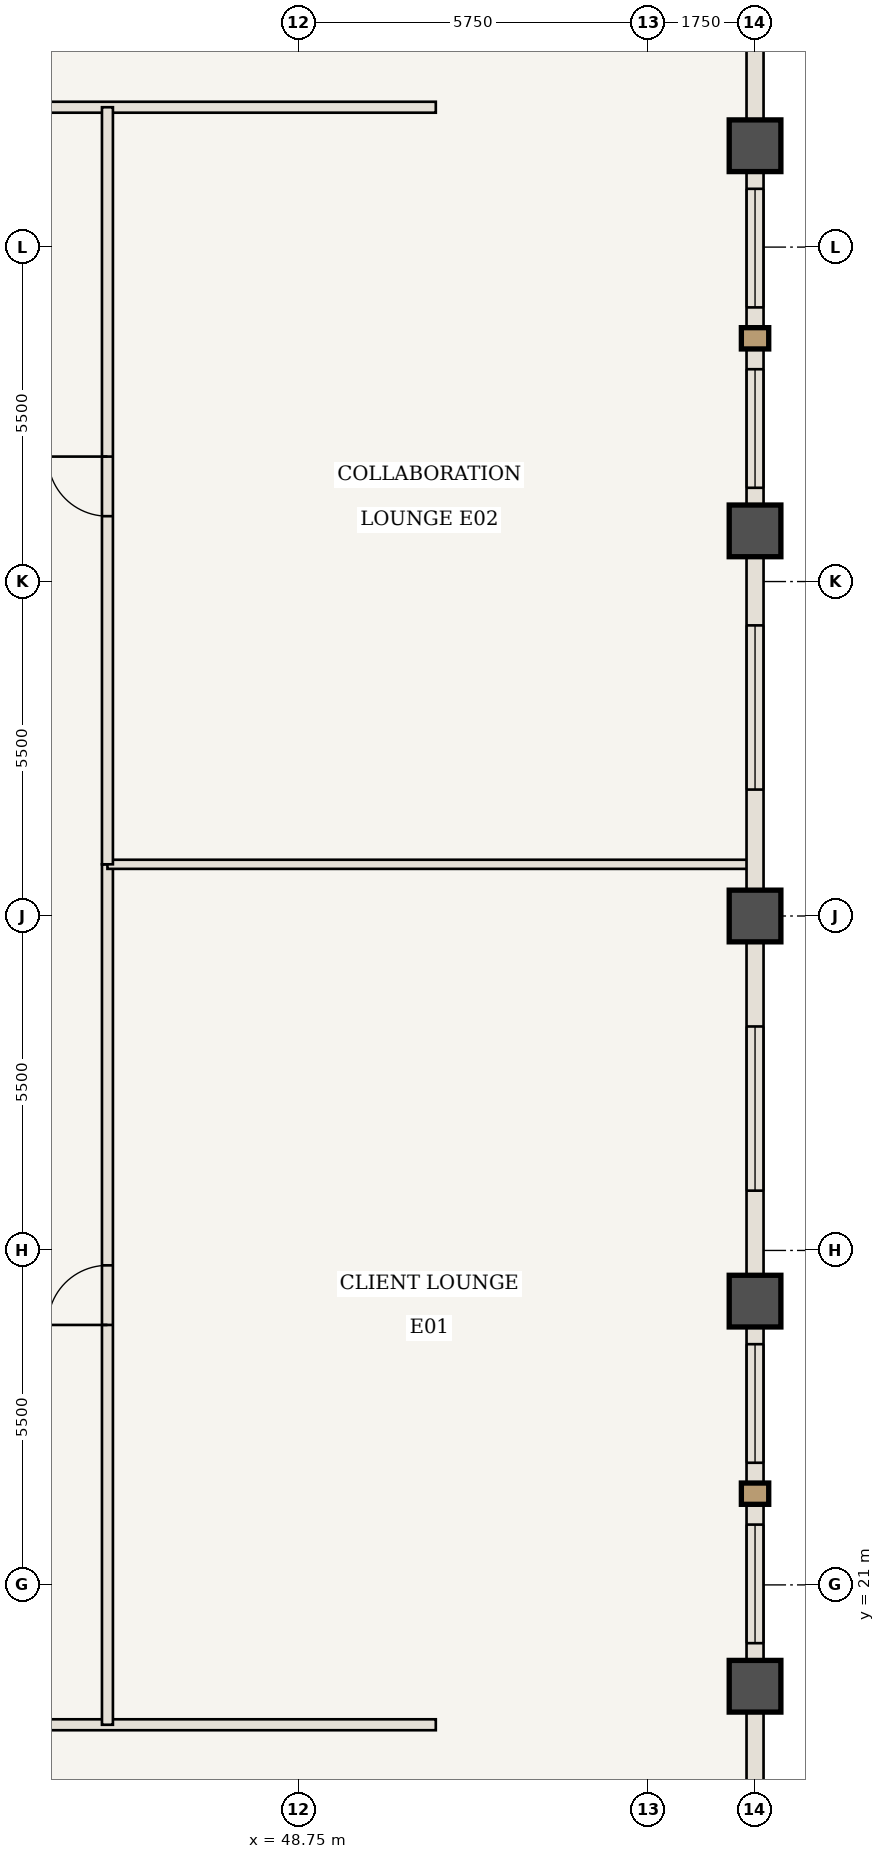
"""IFC4 building model, lengths in metres.
Left out: names, types, materials, properties, quantities, classifications, styles, units other than length and angle.
Written with IfcOpenShell. Run it as: python <this file> out.ifc"""

import sys

from ifc_helpers import new_model, si_unit, direction, frame, frame_2d, origin, origin_2d, place, context, subcontext, project, spatial, rectangle, extrude, element, fill, save


model = new_model("IFC4")
c1 = context("Model", 3, precision=1e-05, world=origin(), true_north=direction((0.0, 1.0)))
c2 = subcontext(c1, "Body", "Model", "MODEL_VIEW")
j1 = project(units=[si_unit("LENGTHUNIT", "METRE"), si_unit("PLANEANGLEUNIT", "RADIAN")], contexts=[c1])
p1 = place(None, origin())
s1 = spatial("IfcSite", under=j1, at=p1, CompositionType="ELEMENT")
p2 = place(p1, origin())
s2 = spatial("IfcBuilding", under=s1, at=p2, CompositionType="ELEMENT")
p3 = place(p2, frame((0.0, 0.0, 210.0)))
s3 = spatial("IfcBuildingStorey", under=s2, at=p3, CompositionType="ELEMENT", Elevation=210.0)
for number, where, z_axis, x_axis in (
    (1, (56.25, 19.333, 0.0), (0.0, 0.0, 1.0), (1.0, 0.0, 0.0)),
    (2, (56.25, 25.667, 0.0), (0.0, 0.0, 1.0), (1.0, 0.0, 0.0)),
    (3, (56.25, 32.0, 0.0), (0.0, 0.0, 1.0), (1.0, 0.0, 0.0)),
    (4, (56.25, 38.333, 0.0), (0.0, 0.0, 1.0), (1.0, 0.0, 0.0)),
    (5, (56.25, 44.667, 0.0), (0.0, 0.0, 1.0), (1.0, 0.0, 0.0)),
):
    element("IfcColumn", number, at=place(p3, frame(where, z_axis=z_axis, x_axis=x_axis)), inside=s3, PredefinedType="COLUMN", context=c2, shape_type="SweptSolid", body=[
        extrude(rectangle(XDim=0.85, YDim=0.85, at=origin_2d()), origin(), (0.0, 0.0, 1.0), 3.85),
    ])
p4 = place(p3, frame((32.925, 18.7, 0.0), z_axis=(0.0, 0.0, 1.0), x_axis=(1.0, 0.0, 0.0)))
e6 = element("IfcWall", 6, at=p4, inside=s3, PredefinedType="STANDARD", context=c2, shape_type="SweptSolid", body=[
    extrude(rectangle(XDim=18.075, YDim=0.18, at=frame_2d((9.038, 0.0))), origin(), (0.0, 0.0, 1.0), 3.685),
])
p5 = place(p4, frame((5.812, 0.0, 0.0)))
e7 = element("IfcOpeningElement", 7, at=p5, cuts=e6, PredefinedType="OPENING", context=c2, shape_type="SweptSolid", body=[
    extrude(rectangle(XDim=0.98, YDim=2.2, at=frame_2d((0.49, 1.1))), frame((0.0, 0.1, 0.0), z_axis=(0.0, -1.0, 0.0), x_axis=(1.0, 0.0, 0.0)), (0.0, 0.0, 1.0), 0.2),
])
p6 = place(p3, frame((24.542, 45.3, 0.0), z_axis=(0.0, 0.0, 1.0), x_axis=(1.0, 0.0, 0.0)))
e8 = element("IfcWall", 8, at=p6, inside=s3, PredefinedType="STANDARD", context=c2, shape_type="SweptSolid", body=[
    extrude(rectangle(XDim=26.458, YDim=0.18, at=frame_2d((13.229, 0.0))), origin(), (0.0, 0.0, 1.0), 3.685),
])
p7 = place(p6, frame((10.004, 0.0, 0.0)))
e9 = element("IfcOpeningElement", 9, at=p7, cuts=e8, PredefinedType="OPENING", context=c2, shape_type="SweptSolid", body=[
    extrude(rectangle(XDim=0.98, YDim=2.2, at=frame_2d((0.49, 1.1))), frame((0.0, 0.1, 0.0), z_axis=(0.0, -1.0, 0.0), x_axis=(1.0, 0.0, 0.0)), (0.0, 0.0, 1.0), 0.2),
])
p8 = place(p3, frame((45.6, 18.7, 0.0), z_axis=(0.0, 0.0, 1.0), x_axis=(0.0, 1.0, 0.0)))
e10 = element("IfcWall", 10, at=p8, inside=s3, PredefinedType="STANDARD", context=c2, shape_type="SweptSolid", body=[
    extrude(rectangle(XDim=14.15, YDim=0.18, at=frame_2d((7.075, 0.0))), origin(), (0.0, 0.0, 1.0), 3.685),
])
p9 = place(p8, frame((6.575, 0.0, 0.0)))
e11 = element("IfcOpeningElement", 11, at=p9, cuts=e10, PredefinedType="OPENING", context=c2, shape_type="SweptSolid", body=[
    extrude(rectangle(XDim=0.98, YDim=2.2, at=frame_2d((0.49, 1.1))), frame((0.0, 0.1, 0.0), z_axis=(0.0, -1.0, 0.0), x_axis=(1.0, 0.0, 0.0)), (0.0, 0.0, 1.0), 0.2),
])
p10 = place(p3, frame((45.6, 32.85, 0.0), z_axis=(0.0, 0.0, 1.0), x_axis=(1.0, 0.0, 0.0)))
e12 = element("IfcWall", 12, at=p10, inside=s3, PredefinedType="STANDARD", context=c2, shape_type="SweptSolid", body=[
    extrude(rectangle(XDim=10.59, YDim=0.15, at=frame_2d((5.295, 0.0))), origin(), (0.0, 0.0, 1.0), 3.685),
])
p11 = place(p3, frame((45.6, 32.85, 0.0), z_axis=(0.0, 0.0, 1.0), x_axis=(0.0, 1.0, 0.0)))
e13 = element("IfcWall", 13, at=p11, inside=s3, PredefinedType="STANDARD", context=c2, shape_type="SweptSolid", body=[
    extrude(rectangle(XDim=12.45, YDim=0.18, at=frame_2d((6.225, 0.0))), origin(), (0.0, 0.0, 1.0), 3.685),
])
p12 = place(p11, frame((5.725, 0.0, 0.0)))
e14 = element("IfcOpeningElement", 14, at=p12, cuts=e13, PredefinedType="OPENING", context=c2, shape_type="SweptSolid", body=[
    extrude(rectangle(XDim=0.98, YDim=2.2, at=frame_2d((0.49, 1.1))), frame((0.0, 0.1, 0.0), z_axis=(0.0, -1.0, 0.0), x_axis=(1.0, 0.0, 0.0)), (0.0, 0.0, 1.0), 0.2),
])
p13 = place(p3, frame((56.25, 19.333, 0.0), z_axis=(0.0, 0.0, 1.0), x_axis=(0.0, -1.0, 0.0)))
e15 = element("IfcWall", 15, at=p13, inside=s3, PredefinedType="USERDEFINED", context=c2, shape_type="SweptSolid", body=[
    extrude(rectangle(XDim=6.333, YDim=0.28, at=frame_2d((3.167, 0.0))), origin(), (0.0, 0.0, 1.0), 2.985),
])
p14 = place(p3, frame((56.25, 25.667, 0.0), z_axis=(0.0, 0.0, 1.0), x_axis=(0.0, -1.0, 0.0)))
e16 = element("IfcWall", 16, at=p14, inside=s3, PredefinedType="USERDEFINED", context=c2, shape_type="SweptSolid", body=[
    extrude(rectangle(XDim=6.333, YDim=0.28, at=frame_2d((3.167, 0.0))), origin(), (0.0, 0.0, 1.0), 2.985),
])
p15 = place(p14, frame((0.708, 0.0, 0.85)))
e17 = element("IfcOpeningElement", 17, at=p15, cuts=e16, PredefinedType="OPENING", context=c2, shape_type="SweptSolid", body=[
    extrude(rectangle(XDim=1.95, YDim=1.935, at=frame_2d((0.975, 0.968))), frame((0.0, 0.15, 0.0), z_axis=(0.0, -1.0, 0.0), x_axis=(1.0, 0.0, 0.0)), (0.0, 0.0, 1.0), 0.3),
])
p16 = place(p14, frame((3.675, 0.0, 0.85)))
e18 = element("IfcOpeningElement", 18, at=p16, cuts=e16, PredefinedType="OPENING", context=c2, shape_type="SweptSolid", body=[
    extrude(rectangle(XDim=1.95, YDim=1.935, at=frame_2d((0.975, 0.968))), frame((0.0, 0.15, 0.0), z_axis=(0.0, -1.0, 0.0), x_axis=(1.0, 0.0, 0.0)), (0.0, 0.0, 1.0), 0.3),
])
p17 = place(p3, frame((56.25, 32.0, 0.0), z_axis=(0.0, 0.0, 1.0), x_axis=(0.0, -1.0, 0.0)))
e19 = element("IfcWall", 19, at=p17, inside=s3, PredefinedType="USERDEFINED", context=c2, shape_type="SweptSolid", body=[
    extrude(rectangle(XDim=6.333, YDim=0.28, at=frame_2d((3.167, 0.0))), origin(), (0.0, 0.0, 1.0), 2.985),
])
p18 = place(p17, frame((1.817, 0.0, 0.85)))
e20 = element("IfcOpeningElement", 20, at=p18, cuts=e19, PredefinedType="OPENING", context=c2, shape_type="SweptSolid", body=[
    extrude(rectangle(XDim=2.7, YDim=1.935, at=frame_2d((1.35, 0.968))), frame((0.0, 0.15, 0.0), z_axis=(0.0, -1.0, 0.0), x_axis=(1.0, 0.0, 0.0)), (0.0, 0.0, 1.0), 0.3),
])
p19 = place(p3, frame((56.25, 38.333, 0.0), z_axis=(0.0, 0.0, 1.0), x_axis=(0.0, -1.0, 0.0)))
e21 = element("IfcWall", 21, at=p19, inside=s3, PredefinedType="USERDEFINED", context=c2, shape_type="SweptSolid", body=[
    extrude(rectangle(XDim=6.333, YDim=0.28, at=frame_2d((3.167, 0.0))), origin(), (0.0, 0.0, 1.0), 2.985),
])
p20 = place(p19, frame((1.554, 0.0, 0.85)))
e22 = element("IfcOpeningElement", 22, at=p20, cuts=e21, PredefinedType="OPENING", context=c2, shape_type="SweptSolid", body=[
    extrude(rectangle(XDim=2.7, YDim=1.935, at=frame_2d((1.35, 0.968))), frame((0.0, 0.15, 0.0), z_axis=(0.0, -1.0, 0.0), x_axis=(1.0, 0.0, 0.0)), (0.0, 0.0, 1.0), 0.3),
])
p21 = place(p3, frame((56.25, 44.667, 0.0), z_axis=(0.0, 0.0, 1.0), x_axis=(0.0, -1.0, 0.0)))
e23 = element("IfcWall", 23, at=p21, inside=s3, PredefinedType="USERDEFINED", context=c2, shape_type="SweptSolid", body=[
    extrude(rectangle(XDim=6.333, YDim=0.28, at=frame_2d((3.167, 0.0))), origin(), (0.0, 0.0, 1.0), 2.985),
])
p22 = place(p21, frame((0.708, 0.0, 0.85)))
e24 = element("IfcOpeningElement", 24, at=p22, cuts=e23, PredefinedType="OPENING", context=c2, shape_type="SweptSolid", body=[
    extrude(rectangle(XDim=1.95, YDim=1.935, at=frame_2d((0.975, 0.968))), frame((0.0, 0.15, 0.0), z_axis=(0.0, -1.0, 0.0), x_axis=(1.0, 0.0, 0.0)), (0.0, 0.0, 1.0), 0.3),
])
p23 = place(p21, frame((3.675, 0.0, 0.85)))
e25 = element("IfcOpeningElement", 25, at=p23, cuts=e23, PredefinedType="OPENING", context=c2, shape_type="SweptSolid", body=[
    extrude(rectangle(XDim=1.95, YDim=1.935, at=frame_2d((0.975, 0.968))), frame((0.0, 0.15, 0.0), z_axis=(0.0, -1.0, 0.0), x_axis=(1.0, 0.0, 0.0)), (0.0, 0.0, 1.0), 0.3),
])
p24 = place(p3, frame((56.25, 51.0, 0.0), z_axis=(0.0, 0.0, 1.0), x_axis=(0.0, -1.0, 0.0)))
e26 = element("IfcWall", 26, at=p24, inside=s3, PredefinedType="USERDEFINED", context=c2, shape_type="SweptSolid", body=[
    extrude(rectangle(XDim=6.333, YDim=0.28, at=frame_2d((3.167, 0.0))), origin(), (0.0, 0.0, 1.0), 2.985),
])
p25 = place(p9, origin())
e27 = element("IfcDoor", 27, at=p25, inside=s3, OperationType="SINGLE_SWING_LEFT", PredefinedType="DOOR", context=c2, shape_type="SweptSolid", body=[
    extrude(rectangle(XDim=0.98, YDim=2.2, at=frame_2d((0.49, 1.1))), frame((0.0, 0.025, 0.0), z_axis=(0.0, -1.0, 0.0), x_axis=(1.0, 0.0, 0.0)), (0.0, 0.0, 1.0), 0.05),
])
fill(e11, e27)
p26 = place(p12, origin())
e28 = element("IfcDoor", 28, at=p26, inside=s3, OperationType="SINGLE_SWING_RIGHT", PredefinedType="DOOR", context=c2, shape_type="SweptSolid", body=[
    extrude(rectangle(XDim=0.98, YDim=2.2, at=frame_2d((0.49, 1.1))), frame((0.0, 0.025, 0.0), z_axis=(0.0, -1.0, 0.0), x_axis=(1.0, 0.0, 0.0)), (0.0, 0.0, 1.0), 0.05),
])
fill(e14, e28)
p27 = place(p15, origin())
e29 = element("IfcWindow", 29, at=p27, inside=s3, PartitioningType="SINGLE_PANEL", PredefinedType="WINDOW", context=c2, shape_type="SweptSolid", body=[
    extrude(rectangle(XDim=1.95, YDim=1.935, at=frame_2d((0.975, 0.968))), frame((0.0, 0.03, 0.0), z_axis=(0.0, -1.0, 0.0), x_axis=(1.0, 0.0, 0.0)), (0.0, 0.0, 1.0), 0.06),
])
fill(e17, e29)
p28 = place(p16, origin())
e30 = element("IfcWindow", 30, at=p28, inside=s3, PartitioningType="SINGLE_PANEL", PredefinedType="WINDOW", context=c2, shape_type="SweptSolid", body=[
    extrude(rectangle(XDim=1.95, YDim=1.935, at=frame_2d((0.975, 0.968))), frame((0.0, 0.03, 0.0), z_axis=(0.0, -1.0, 0.0), x_axis=(1.0, 0.0, 0.0)), (0.0, 0.0, 1.0), 0.06),
])
fill(e18, e30)
p29 = place(p18, origin())
e31 = element("IfcWindow", 31, at=p29, inside=s3, PartitioningType="SINGLE_PANEL", PredefinedType="WINDOW", context=c2, shape_type="SweptSolid", body=[
    extrude(rectangle(XDim=2.7, YDim=1.935, at=frame_2d((1.35, 0.968))), frame((0.0, 0.03, 0.0), z_axis=(0.0, -1.0, 0.0), x_axis=(1.0, 0.0, 0.0)), (0.0, 0.0, 1.0), 0.06),
])
fill(e20, e31)
p30 = place(p20, origin())
e32 = element("IfcWindow", 32, at=p30, inside=s3, PartitioningType="SINGLE_PANEL", PredefinedType="WINDOW", context=c2, shape_type="SweptSolid", body=[
    extrude(rectangle(XDim=2.7, YDim=1.935, at=frame_2d((1.35, 0.968))), frame((0.0, 0.03, 0.0), z_axis=(0.0, -1.0, 0.0), x_axis=(1.0, 0.0, 0.0)), (0.0, 0.0, 1.0), 0.06),
])
fill(e22, e32)
p31 = place(p22, origin())
e33 = element("IfcWindow", 33, at=p31, inside=s3, PartitioningType="SINGLE_PANEL", PredefinedType="WINDOW", context=c2, shape_type="SweptSolid", body=[
    extrude(rectangle(XDim=1.95, YDim=1.935, at=frame_2d((0.975, 0.968))), frame((0.0, 0.03, 0.0), z_axis=(0.0, -1.0, 0.0), x_axis=(1.0, 0.0, 0.0)), (0.0, 0.0, 1.0), 0.06),
])
fill(e24, e33)
p32 = place(p23, origin())
e34 = element("IfcWindow", 34, at=p32, inside=s3, PartitioningType="SINGLE_PANEL", PredefinedType="WINDOW", context=c2, shape_type="SweptSolid", body=[
    extrude(rectangle(XDim=1.95, YDim=1.935, at=frame_2d((0.975, 0.968))), frame((0.0, 0.03, 0.0), z_axis=(0.0, -1.0, 0.0), x_axis=(1.0, 0.0, 0.0)), (0.0, 0.0, 1.0), 0.06),
])
fill(e25, e34)
save(model, sys.argv[1])
